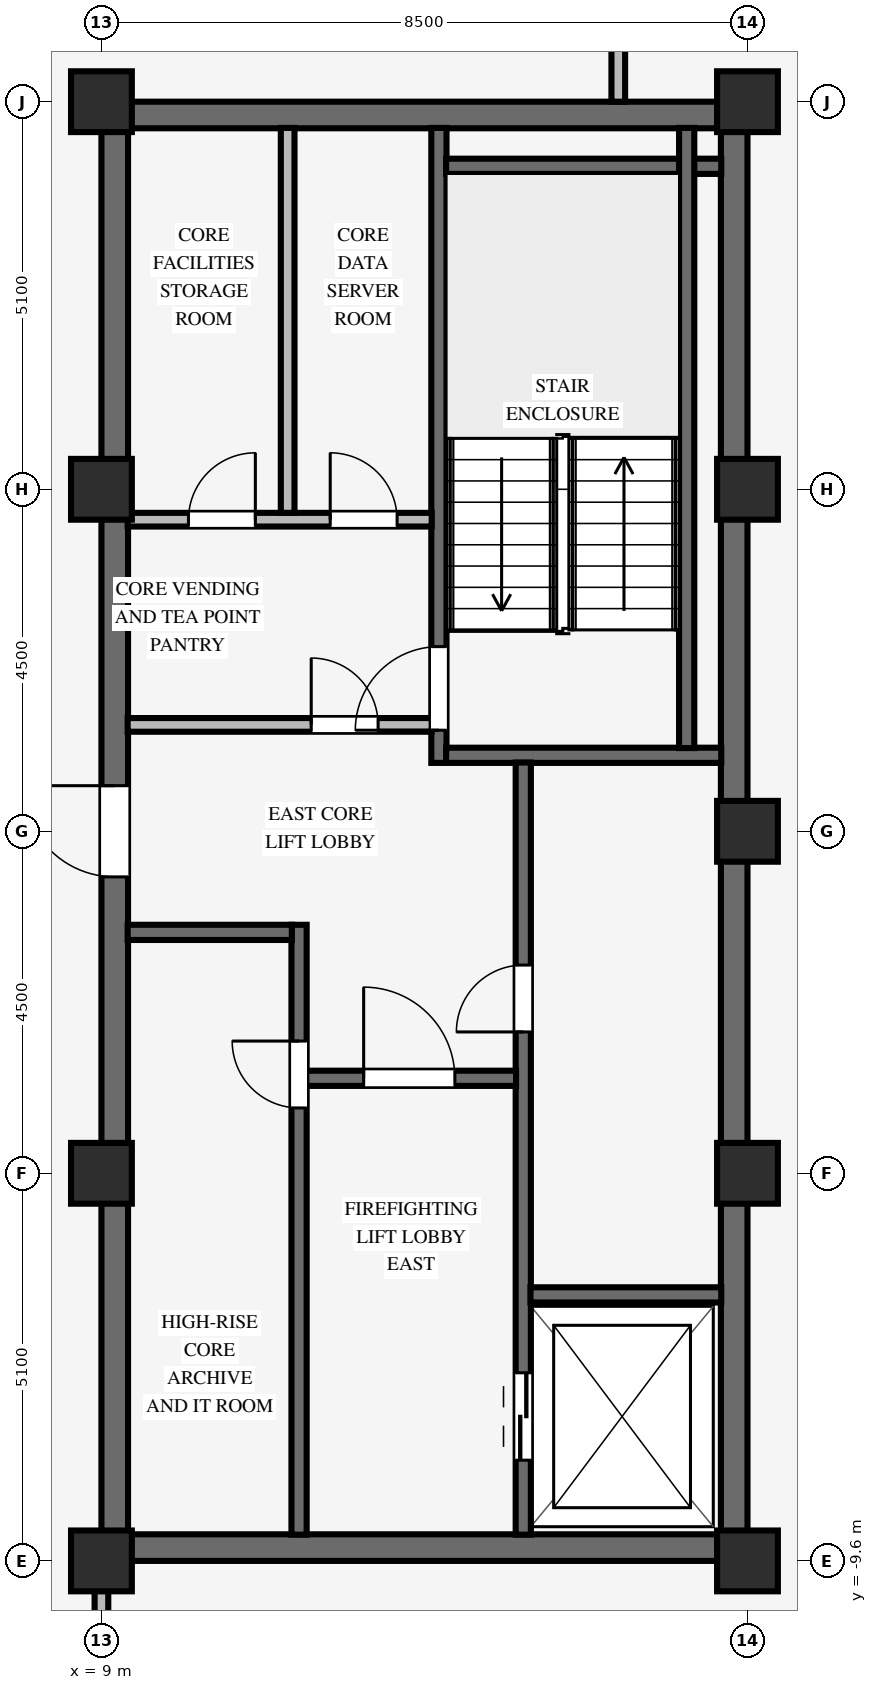
"""IFC4 building model, lengths in metres.
Left out: names, types, materials, properties, quantities, classifications, styles, units other than length and angle.
Written with IfcOpenShell. Run it as: python <this file> out.ifc"""

import sys

from ifc_helpers import new_model, si_unit, direction, frame, frame_2d, origin, origin_2d, place, context, subcontext, project, spatial, rectangle, extrude, source, transform, mapped, element, fill, save


model = new_model("IFC4")
c1 = context("Model", 3, precision=1e-05, world=origin(), true_north=direction((0.0, 1.0)))
c2 = subcontext(c1, "Body", "Model", "MODEL_VIEW")
j1 = project(units=[si_unit("LENGTHUNIT", "METRE"), si_unit("PLANEANGLEUNIT", "RADIAN")], contexts=[c1])
p1 = place(None, origin())
s1 = spatial("IfcSite", under=j1, at=p1, CompositionType="ELEMENT")
p2 = place(p1, origin())
s2 = spatial("IfcBuilding", under=s1, at=p2, CompositionType="ELEMENT")
p3 = place(p2, frame((0.0, 0.0, 261.6)))
s3 = spatial("IfcBuildingStorey", under=s2, at=p3, CompositionType="ELEMENT", Elevation=261.6)
for number, where, z_axis, x_axis in (
    (1, (9.0, -9.425, 0.0), (0.0, 0.0, 1.0), (1.0, 0.0, 0.0)),
    (2, (9.0, 9.425, 0.0), (0.0, 0.0, 1.0), (1.0, 0.0, 0.0)),
):
    element("IfcWall", number, at=place(p3, frame(where, z_axis=z_axis, x_axis=x_axis)), inside=s3, PredefinedType="SHEAR", context=c2, shape_type="SweptSolid", body=[
        extrude(rectangle(XDim=8.5, YDim=0.35, at=frame_2d((4.25, 0.0))), origin(), (0.0, 0.0, 1.0), 3.37),
    ])
p4 = place(p3, frame((9.175, -9.255, 0.0), z_axis=(0.0, 0.0, 1.0), x_axis=(0.0, 1.0, 0.0)))
e3 = element("IfcWall", 3, at=p4, inside=s3, PredefinedType="SHEAR", context=c2, shape_type="SweptSolid", body=[
    extrude(rectangle(XDim=18.51, YDim=0.35, at=frame_2d((9.255, 0.0))), origin(), (0.0, 0.0, 1.0), 3.37),
])
p5 = place(p4, frame((8.655, 0.0, 0.0)))
e4 = element("IfcOpeningElement", 4, at=p5, cuts=e3, PredefinedType="OPENING", context=c2, shape_type="SweptSolid", body=[
    extrude(rectangle(XDim=1.2, YDim=2.15, at=frame_2d((0.6, 1.075))), frame((0.0, 0.185, 0.0), z_axis=(0.0, -1.0, 0.0), x_axis=(1.0, 0.0, 0.0)), (0.0, 0.0, 1.0), 0.37),
])
p6 = place(p3, frame((17.325, -9.255, 0.0), z_axis=(0.0, 0.0, 1.0), x_axis=(0.0, 1.0, 0.0)))
e5 = element("IfcWall", 5, at=p6, inside=s3, PredefinedType="SHEAR", context=c2, shape_type="SweptSolid", body=[
    extrude(rectangle(XDim=18.51, YDim=0.35, at=frame_2d((9.255, 0.0))), origin(), (0.0, 0.0, 1.0), 3.37),
])
for number, where, z_axis, x_axis in (
    (6, (9.0, -9.6, 0.0), (0.0, 0.0, 1.0), (1.0, 0.0, 0.0)),
    (7, (9.0, -4.5, 0.0), (0.0, 0.0, 1.0), (1.0, 0.0, 0.0)),
    (8, (9.0, 4.5, 0.0), (0.0, 0.0, 1.0), (1.0, 0.0, 0.0)),
    (9, (9.0, 9.6, 0.0), (0.0, 0.0, 1.0), (1.0, 0.0, 0.0)),
    (10, (17.5, -9.6, 0.0), (0.0, 0.0, 1.0), (1.0, 0.0, 0.0)),
    (11, (17.5, -4.5, 0.0), (0.0, 0.0, 1.0), (1.0, 0.0, 0.0)),
    (12, (17.5, 4.5, 0.0), (0.0, 0.0, 1.0), (1.0, 0.0, 0.0)),
    (13, (17.5, 9.6, 0.0), (0.0, 0.0, 1.0), (1.0, 0.0, 0.0)),
    (14, (17.5, 0.0, 0.0), (0.0, 0.0, 1.0), (1.0, 0.0, 0.0)),
):
    element("IfcColumn", number, at=place(p3, frame(where, z_axis=z_axis, x_axis=x_axis)), inside=s3, PredefinedType="COLUMN", context=c2, shape_type="SweptSolid", body=[
        extrude(rectangle(XDim=0.8, YDim=0.8, at=origin_2d()), origin(), (0.0, 0.0, 1.0), 3.37),
    ])
p7 = place(p3, frame((13.44, 0.9, 0.0), z_axis=(0.0, 0.0, 1.0), x_axis=(0.0, 1.0, 0.0)))
e15 = element("IfcWall", 15, at=p7, inside=s3, PredefinedType="SHEAR", context=c2, shape_type="SweptSolid", body=[
    extrude(rectangle(XDim=8.355, YDim=0.2, at=frame_2d((4.177, 0.0))), origin(), (0.0, 0.0, 1.0), 3.37),
])
p8 = place(p7, frame((0.43, 0.0, 0.0)))
e16 = element("IfcOpeningElement", 16, at=p8, cuts=e15, PredefinedType="OPENING", context=c2, shape_type="SweptSolid", body=[
    extrude(rectangle(XDim=1.1, YDim=2.15, at=frame_2d((0.55, 1.075))), frame((0.0, 0.11, 0.0), z_axis=(0.0, -1.0, 0.0), x_axis=(1.0, 0.0, 0.0)), (0.0, 0.0, 1.0), 0.22),
])
for number, where, z_axis, x_axis in (
    (17, (13.535, 1.0, 0.0), (0.0, 0.0, 1.0), (1.0, 0.0, 0.0)),
    (18, (13.535, 8.75, 0.0), (0.0, 0.0, 1.0), (1.0, 0.0, 0.0)),
):
    element("IfcWall", number, at=place(p3, frame(where, z_axis=z_axis, x_axis=x_axis)), inside=s3, PredefinedType="SHEAR", context=c2, shape_type="SweptSolid", body=[
        extrude(rectangle(XDim=3.62, YDim=0.2, at=frame_2d((1.81, 0.0))), origin(), (0.0, 0.0, 1.0), 3.37),
    ])
p9 = place(p3, frame((16.7, 1.095, 0.0), z_axis=(0.0, 0.0, 1.0), x_axis=(0.0, 1.0, 0.0)))
e19 = element("IfcWall", 19, at=p9, inside=s3, PredefinedType="SHEAR", context=c2, shape_type="SweptSolid", body=[
    extrude(rectangle(XDim=8.16, YDim=0.2, at=frame_2d((4.08, 0.0))), origin(), (0.0, 0.0, 1.0), 3.37),
])
p10 = place(p3, frame((14.55, -9.255, 0.0), z_axis=(0.0, 0.0, 1.0), x_axis=(0.0, 1.0, 0.0)))
e20 = element("IfcWall", 20, at=p10, inside=s3, PredefinedType="SHEAR", context=c2, shape_type="SweptSolid", body=[
    extrude(rectangle(XDim=10.16, YDim=0.2, at=frame_2d((5.08, 0.0))), origin(), (0.0, 0.0, 1.0), 3.37),
])
p11 = place(p10, frame((6.615, 0.0, 0.0)))
e21 = element("IfcOpeningElement", 21, at=p11, cuts=e20, PredefinedType="OPENING", context=c2, shape_type="SweptSolid", body=[
    extrude(rectangle(XDim=0.88, YDim=2.1, at=frame_2d((0.44, 1.05))), frame((0.0, 0.11, 0.0), z_axis=(0.0, -1.0, 0.0), x_axis=(1.0, 0.0, 0.0)), (0.0, 0.0, 1.0), 0.22),
])
p12 = place(p10, frame((0.98, 0.0, 0.0)))
e22 = element("IfcOpeningElement", 22, at=p12, cuts=e20, PredefinedType="OPENING", context=c2, shape_type="SweptSolid", body=[
    extrude(rectangle(XDim=1.15, YDim=2.15, at=frame_2d((0.575, 1.075))), frame((0.0, 0.11, 0.0), z_axis=(0.0, -1.0, 0.0), x_axis=(1.0, 0.0, 0.0)), (0.0, 0.0, 1.0), 0.22),
])
p13 = place(p3, frame((14.645, -6.1, 0.0), z_axis=(0.0, 0.0, 1.0), x_axis=(1.0, 0.0, 0.0)))
e23 = element("IfcWall", 23, at=p13, inside=s3, PredefinedType="SHEAR", context=c2, shape_type="SweptSolid", body=[
    extrude(rectangle(XDim=2.51, YDim=0.2, at=frame_2d((1.255, 0.0))), origin(), (0.0, 0.0, 1.0), 3.37),
])
p14 = place(p3, frame((11.6, -9.255, 0.0), z_axis=(0.0, 0.0, 1.0), x_axis=(0.0, 1.0, 0.0)))
e24 = element("IfcWall", 24, at=p14, inside=s3, PredefinedType="SHEAR", context=c2, shape_type="SweptSolid", body=[
    extrude(rectangle(XDim=8.025, YDim=0.2, at=frame_2d((4.012, 0.0))), origin(), (0.0, 0.0, 1.0), 3.37),
])
p15 = place(p14, frame((5.615, 0.0, 0.0)))
e25 = element("IfcOpeningElement", 25, at=p15, cuts=e24, PredefinedType="OPENING", context=c2, shape_type="SweptSolid", body=[
    extrude(rectangle(XDim=0.88, YDim=2.1, at=frame_2d((0.44, 1.05))), frame((0.0, 0.11, 0.0), z_axis=(0.0, -1.0, 0.0), x_axis=(1.0, 0.0, 0.0)), (0.0, 0.0, 1.0), 0.22),
])
p16 = place(p3, frame((11.695, -3.25, 0.0), z_axis=(0.0, 0.0, 1.0), x_axis=(1.0, 0.0, 0.0)))
e26 = element("IfcWall", 26, at=p16, inside=s3, PredefinedType="SHEAR", context=c2, shape_type="SweptSolid", body=[
    extrude(rectangle(XDim=2.76, YDim=0.2, at=frame_2d((1.38, 0.0))), origin(), (0.0, 0.0, 1.0), 3.37),
])
p17 = place(p16, frame((0.755, 0.0, 0.0)))
e27 = element("IfcOpeningElement", 27, at=p17, cuts=e26, PredefinedType="OPENING", context=c2, shape_type="SweptSolid", body=[
    extrude(rectangle(XDim=1.2, YDim=2.15, at=frame_2d((0.6, 1.075))), frame((0.0, 0.11, 0.0), z_axis=(0.0, -1.0, 0.0), x_axis=(1.0, 0.0, 0.0)), (0.0, 0.0, 1.0), 0.22),
])
p18 = place(p3, frame((9.345, -1.33, 0.0), z_axis=(0.0, 0.0, 1.0), x_axis=(1.0, 0.0, 0.0)))
e28 = element("IfcWall", 28, at=p18, inside=s3, PredefinedType="SHEAR", context=c2, shape_type="SweptSolid", body=[
    extrude(rectangle(XDim=2.16, YDim=0.2, at=frame_2d((1.08, 0.0))), origin(), (0.0, 0.0, 1.0), 3.37),
])
p19 = place(p3, frame((9.345, 1.4, 0.0), z_axis=(0.0, 0.0, 1.0), x_axis=(1.0, 0.0, 0.0)))
e29 = element("IfcWall", 29, at=p19, inside=s3, PredefinedType="PARTITIONING", context=c2, shape_type="SweptSolid", body=[
    extrude(rectangle(XDim=4.0, YDim=0.18, at=frame_2d((2.0, 0.0))), origin(), (0.0, 0.0, 1.0), 3.36),
])
p20 = place(p19, frame((2.415, 0.0, 0.0)))
e30 = element("IfcOpeningElement", 30, at=p20, cuts=e29, PredefinedType="OPENING", context=c2, shape_type="SweptSolid", body=[
    extrude(rectangle(XDim=0.88, YDim=2.1, at=frame_2d((0.44, 1.05))), frame((0.0, 0.1, 0.0), z_axis=(0.0, -1.0, 0.0), x_axis=(1.0, 0.0, 0.0)), (0.0, 0.0, 1.0), 0.2),
])
p21 = place(p3, frame((9.345, 4.1, 0.0), z_axis=(0.0, 0.0, 1.0), x_axis=(1.0, 0.0, 0.0)))
e31 = element("IfcWall", 31, at=p21, inside=s3, PredefinedType="PARTITIONING", context=c2, shape_type="SweptSolid", body=[
    extrude(rectangle(XDim=4.0, YDim=0.18, at=frame_2d((2.0, 0.0))), origin(), (0.0, 0.0, 1.0), 3.36),
])
p22 = place(p21, frame((0.8, 0.0, 0.0)))
e32 = element("IfcOpeningElement", 32, at=p22, cuts=e31, PredefinedType="OPENING", context=c2, shape_type="SweptSolid", body=[
    extrude(rectangle(XDim=0.88, YDim=2.1, at=frame_2d((0.44, 1.05))), frame((0.0, 0.1, 0.0), z_axis=(0.0, -1.0, 0.0), x_axis=(1.0, 0.0, 0.0)), (0.0, 0.0, 1.0), 0.2),
])
p23 = place(p21, frame((2.665, 0.0, 0.0)))
e33 = element("IfcOpeningElement", 33, at=p23, cuts=e31, PredefinedType="OPENING", context=c2, shape_type="SweptSolid", body=[
    extrude(rectangle(XDim=0.88, YDim=2.1, at=frame_2d((0.44, 1.05))), frame((0.0, 0.1, 0.0), z_axis=(0.0, -1.0, 0.0), x_axis=(1.0, 0.0, 0.0)), (0.0, 0.0, 1.0), 0.2),
])
p24 = place(p3, frame((11.45, 4.19, 0.0), z_axis=(0.0, 0.0, 1.0), x_axis=(0.0, 1.0, 0.0)))
e34 = element("IfcWall", 34, at=p24, inside=s3, PredefinedType="PARTITIONING", context=c2, shape_type="SweptSolid", body=[
    extrude(rectangle(XDim=5.065, YDim=0.18, at=frame_2d((2.532, 0.0))), origin(), (0.0, 0.0, 1.0), 3.36),
])
p25 = place(p3, frame((9.0, -15.314, 0.0), z_axis=(0.0, 0.0, 1.0), x_axis=(0.0, 1.0, 0.0)))
e35 = element("IfcWall", 35, at=p25, inside=s3, PredefinedType="PARTITIONING", context=c2, shape_type="SweptSolid", body=[
    extrude(rectangle(XDim=5.318, YDim=0.18, at=frame_2d((2.659, 0.0))), origin(), (0.0, 0.0, 1.0), 2.892),
])
p26 = place(p25, frame((2.179, 0.0, 0.0)))
e36 = element("IfcOpeningElement", 36, at=p26, cuts=e35, PredefinedType="OPENING", context=c2, shape_type="SweptSolid", body=[
    extrude(rectangle(XDim=0.96, YDim=2.1, at=frame_2d((0.48, 1.05))), frame((0.0, 0.1, 0.0), z_axis=(0.0, -1.0, 0.0), x_axis=(1.0, 0.0, 0.0)), (0.0, 0.0, 1.0), 0.2),
])
p27 = place(p3, frame((15.8, 9.6, 0.0), z_axis=(0.0, 0.0, 1.0), x_axis=(0.0, 1.0, 0.0)))
e37 = element("IfcWall", 37, at=p27, inside=s3, PredefinedType="PARTITIONING", context=c2, shape_type="SweptSolid", body=[
    extrude(rectangle(XDim=2.514, YDim=0.18, at=frame_2d((1.257, 0.0))), origin(), (0.0, 0.0, 1.0), 3.36),
])
m1 = source(origin(), c2, "Body", "SweptSolid", [
    extrude(rectangle(XDim=1.1, YDim=2.15, at=frame_2d((0.55, 1.075))), frame((0.0, 0.025, 0.0), z_axis=(0.0, -1.0, 0.0), x_axis=(1.0, 0.0, 0.0)), (0.0, 0.0, 1.0), 0.05),
])
p28 = place(p8, origin())
e38 = element("IfcDoor", 38, at=p28, inside=s3, OperationType="SINGLE_SWING_LEFT", PredefinedType="DOOR", context=c2, shape_type="MappedRepresentation", body=[
    mapped(m1, transform((0.0, 0.0, 0.0), scale=1.0)),
])
fill(e16, e38)
m2 = source(origin(), c2, "Body", "SweptSolid", [
    extrude(rectangle(XDim=0.88, YDim=2.1, at=frame_2d((0.44, 1.05))), frame((0.0, 0.025, 0.0), z_axis=(0.0, -1.0, 0.0), x_axis=(1.0, 0.0, 0.0)), (0.0, 0.0, 1.0), 0.05),
])
p29 = place(p11, origin())
e39 = element("IfcDoor", 39, at=p29, inside=s3, OperationType="SINGLE_SWING_LEFT", PredefinedType="DOOR", context=c2, shape_type="MappedRepresentation", body=[
    mapped(m2, transform((0.0, 0.0, 0.0), scale=1.0)),
])
fill(e21, e39)
m3 = source(origin(), c2, "Body", "SweptSolid", [
    extrude(rectangle(XDim=1.2, YDim=2.15, at=frame_2d((0.6, 1.075))), frame((0.0, 0.025, 0.0), z_axis=(0.0, -1.0, 0.0), x_axis=(1.0, 0.0, 0.0)), (0.0, 0.0, 1.0), 0.05),
])
p30 = place(p17, origin())
e40 = element("IfcDoor", 40, at=p30, inside=s3, OperationType="SINGLE_SWING_LEFT", PredefinedType="DOOR", context=c2, shape_type="MappedRepresentation", body=[
    mapped(m3, transform((0.0, 0.0, 0.0), scale=1.0)),
])
fill(e27, e40)
p31 = place(p15, origin())
e41 = element("IfcDoor", 41, at=p31, inside=s3, OperationType="SINGLE_SWING_RIGHT", PredefinedType="DOOR", context=c2, shape_type="MappedRepresentation", body=[
    mapped(m2, transform((0.0, 0.0, 0.0), scale=1.0)),
])
fill(e25, e41)
p32 = place(p5, origin())
e42 = element("IfcDoor", 42, at=p32, inside=s3, OperationType="SINGLE_SWING_RIGHT", PredefinedType="DOOR", context=c2, shape_type="MappedRepresentation", body=[
    mapped(m3, transform((0.0, 0.0, 0.0), scale=1.0)),
])
fill(e4, e42)
p33 = place(p20, origin())
e43 = element("IfcDoor", 43, at=p33, inside=s3, OperationType="SINGLE_SWING_LEFT", PredefinedType="DOOR", context=c2, shape_type="MappedRepresentation", body=[
    mapped(m2, transform((0.0, 0.0, 0.0), scale=1.0)),
])
fill(e30, e43)
p34 = place(p22, origin())
e44 = element("IfcDoor", 44, at=p34, inside=s3, OperationType="SINGLE_SWING_RIGHT", PredefinedType="DOOR", context=c2, shape_type="MappedRepresentation", body=[
    mapped(m2, transform((0.0, 0.0, 0.0), scale=1.0)),
])
fill(e32, e44)
p35 = place(p23, origin())
e45 = element("IfcDoor", 45, at=p35, inside=s3, OperationType="SINGLE_SWING_LEFT", PredefinedType="DOOR", context=c2, shape_type="MappedRepresentation", body=[
    mapped(m2, transform((0.0, 0.0, 0.0), scale=1.0)),
])
fill(e33, e45)
m4 = source(origin(), c2, "Body", "SweptSolid", [
    extrude(rectangle(XDim=1.15, YDim=2.15, at=frame_2d((0.575, 1.075))), frame((0.0, 0.025, 0.0), z_axis=(0.0, -1.0, 0.0), x_axis=(1.0, 0.0, 0.0)), (0.0, 0.0, 1.0), 0.05),
])
p36 = place(p12, origin())
e46 = element("IfcDoor", 46, at=p36, inside=s3, OperationType="DOUBLE_DOOR_SLIDING", PredefinedType="DOOR", context=c2, shape_type="MappedRepresentation", body=[
    mapped(m4, transform((0.0, 0.0, 0.0), scale=1.0)),
])
fill(e22, e46)
save(model, sys.argv[1])
